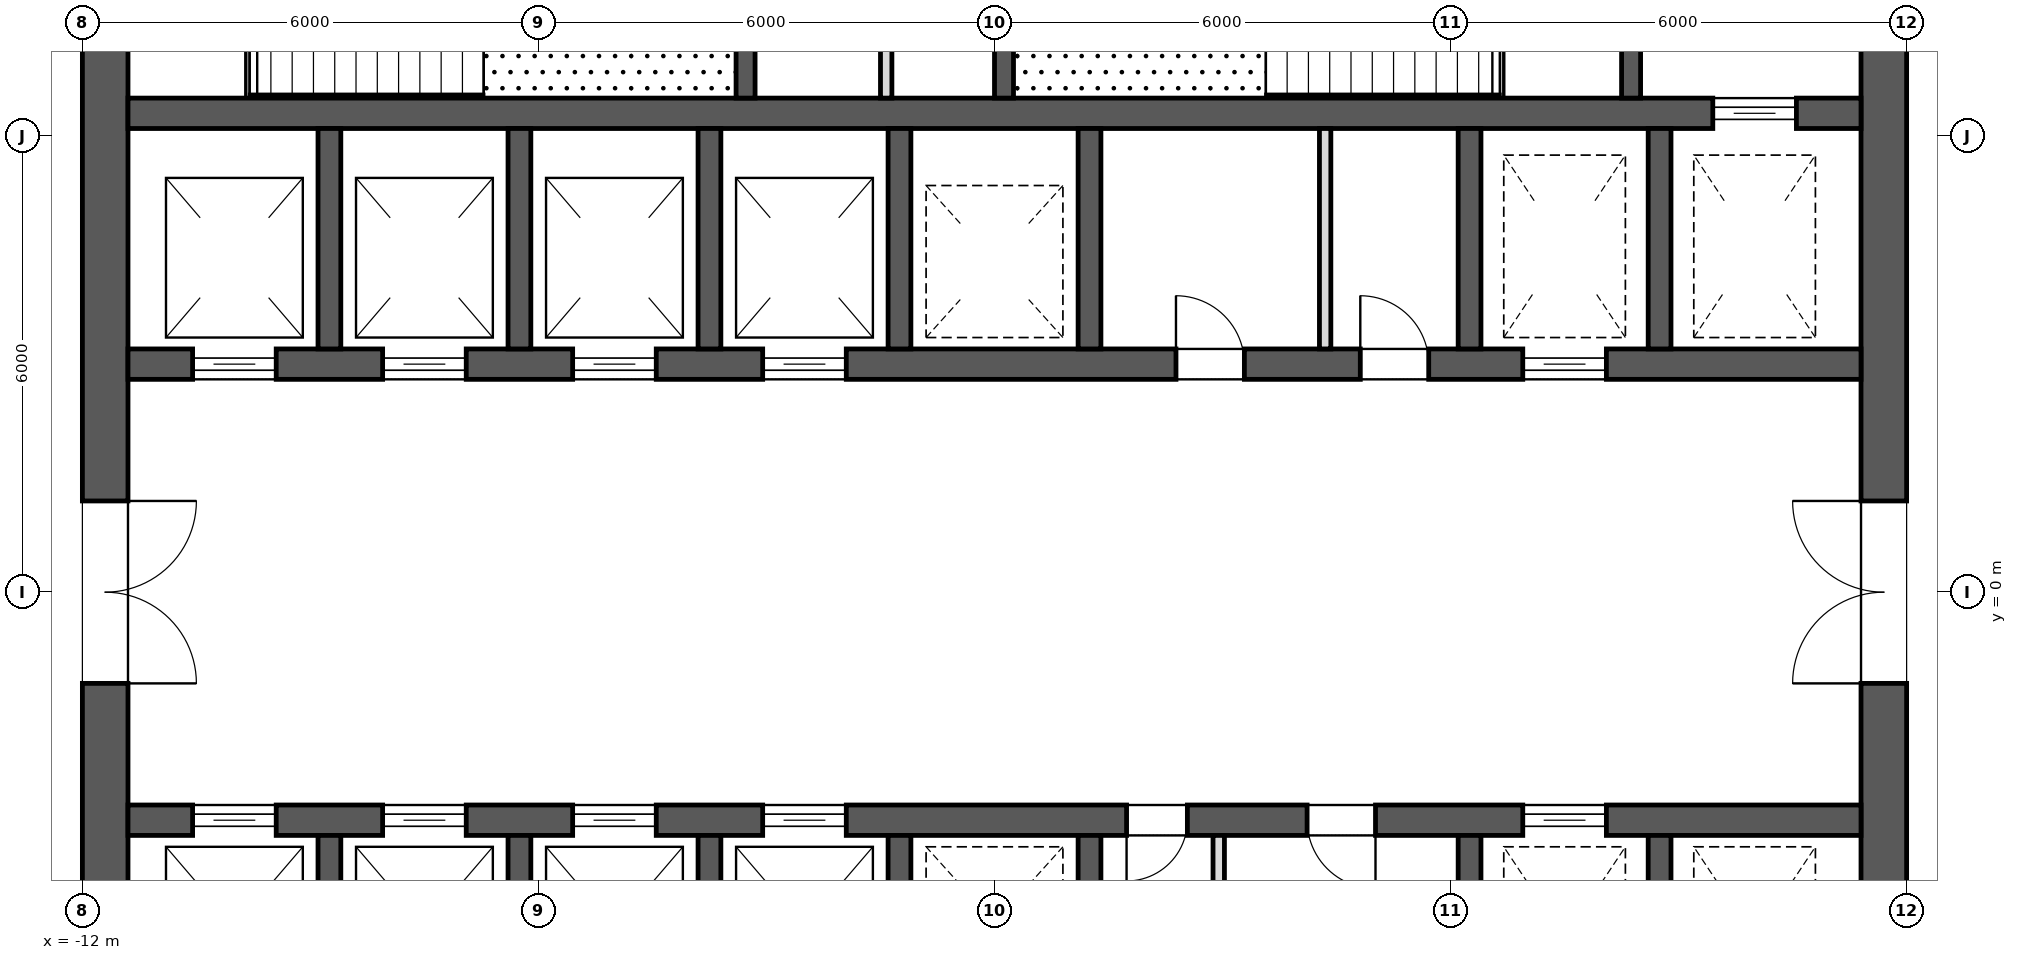
"""IFC4 building model, lengths in metres.
Left out: names, types, materials, properties, quantities, classifications, styles, units other than length and angle.
Written with IfcOpenShell. Run it as: python <this file> out.ifc"""

import sys

from ifc_helpers import new_model, si_unit, direction, frame, frame_2d, origin, place, context, subcontext, project, spatial, rectangle, extrude, element, fill, save


model = new_model("IFC4")
c1 = context("Model", 3, precision=1e-05, world=origin(), true_north=direction((0.0, 1.0)))
c2 = subcontext(c1, "Body", "Model", "MODEL_VIEW")
j1 = project(units=[si_unit("LENGTHUNIT", "METRE"), si_unit("PLANEANGLEUNIT", "RADIAN")], contexts=[c1])
p1 = place(None, origin())
s1 = spatial("IfcSite", under=j1, at=p1, CompositionType="ELEMENT")
p2 = place(p1, origin())
s2 = spatial("IfcBuilding", under=s1, at=p2, CompositionType="ELEMENT")
p3 = place(p2, frame((0.0, 0.0, 210.9)))
s3 = spatial("IfcBuildingStorey", under=s2, at=p3, CompositionType="ELEMENT", Elevation=210.9)
p4 = place(p3, frame((11.7, -11.4, 0.0), z_axis=(0.0, 0.0, 1.0), x_axis=(0.0, 1.0, 0.0)))
e1 = element("IfcWall", 1, at=p4, inside=s3, PredefinedType="SHEAR", context=c2, shape_type="SweptSolid", body=[
    extrude(rectangle(XDim=22.8, YDim=0.6, at=frame_2d((11.4, 0.0))), origin(), (0.0, 0.0, 1.0), 4.0),
])
p5 = place(p4, frame((10.2, 0.0, 0.0)))
e2 = element("IfcOpeningElement", 2, at=p5, cuts=e1, PredefinedType="OPENING", context=c2, shape_type="SweptSolid", body=[
    extrude(rectangle(XDim=2.4, YDim=2.1, at=frame_2d((1.2, 1.05))), frame((0.0, 0.312, 0.0), z_axis=(0.0, -1.0, 0.0), x_axis=(1.0, 0.0, 0.0)), (0.0, 0.0, 1.0), 0.624),
])
p6 = place(p4, frame((19.5, 0.0, 0.0)))
e3 = element("IfcOpeningElement", 3, at=p6, cuts=e1, PredefinedType="OPENING", context=c2, shape_type="SweptSolid", body=[
    extrude(rectangle(XDim=1.2, YDim=2.1, at=frame_2d((0.6, 1.05))), frame((0.0, 0.312, 0.0), z_axis=(0.0, -1.0, 0.0), x_axis=(1.0, 0.0, 0.0)), (0.0, 0.0, 1.0), 0.624),
])
p7 = place(p4, frame((2.1, 0.0, 0.0)))
e4 = element("IfcOpeningElement", 4, at=p7, cuts=e1, PredefinedType="OPENING", context=c2, shape_type="SweptSolid", body=[
    extrude(rectangle(XDim=1.2, YDim=2.1, at=frame_2d((0.6, 1.05))), frame((0.0, 0.312, 0.0), z_axis=(0.0, -1.0, 0.0), x_axis=(1.0, 0.0, 0.0)), (0.0, 0.0, 1.0), 0.624),
])
p8 = place(p3, frame((-11.7, -11.4, 0.0), z_axis=(0.0, 0.0, 1.0), x_axis=(0.0, 1.0, 0.0)))
e5 = element("IfcWall", 5, at=p8, inside=s3, PredefinedType="SHEAR", context=c2, shape_type="SweptSolid", body=[
    extrude(rectangle(XDim=22.8, YDim=0.6, at=frame_2d((11.4, 0.0))), origin(), (0.0, 0.0, 1.0), 4.0),
])
p9 = place(p8, frame((10.2, 0.0, 0.0)))
e6 = element("IfcOpeningElement", 6, at=p9, cuts=e5, PredefinedType="OPENING", context=c2, shape_type="SweptSolid", body=[
    extrude(rectangle(XDim=2.4, YDim=2.1, at=frame_2d((1.2, 1.05))), frame((0.0, 0.312, 0.0), z_axis=(0.0, -1.0, 0.0), x_axis=(1.0, 0.0, 0.0)), (0.0, 0.0, 1.0), 0.624),
])
p10 = place(p8, frame((18.925, 0.0, 0.0)))
e7 = element("IfcOpeningElement", 7, at=p10, cuts=e5, PredefinedType="OPENING", context=c2, shape_type="SweptSolid", body=[
    extrude(rectangle(XDim=1.2, YDim=2.1, at=frame_2d((0.6, 1.05))), frame((0.0, 0.312, 0.0), z_axis=(0.0, -1.0, 0.0), x_axis=(1.0, 0.0, 0.0)), (0.0, 0.0, 1.0), 0.624),
])
p11 = place(p8, frame((2.675, 0.0, 0.0)))
e8 = element("IfcOpeningElement", 8, at=p11, cuts=e5, PredefinedType="OPENING", context=c2, shape_type="SweptSolid", body=[
    extrude(rectangle(XDim=1.2, YDim=2.1, at=frame_2d((0.6, 1.05))), frame((0.0, 0.312, 0.0), z_axis=(0.0, -1.0, 0.0), x_axis=(1.0, 0.0, 0.0)), (0.0, 0.0, 1.0), 0.624),
])
p12 = place(p3, frame((-11.4, 3.0, 0.0), z_axis=(0.0, 0.0, 1.0), x_axis=(1.0, 0.0, 0.0)))
e9 = element("IfcWall", 9, at=p12, inside=s3, PredefinedType="SHEAR", context=c2, shape_type="SweptSolid", body=[
    extrude(rectangle(XDim=22.8, YDim=0.4, at=frame_2d((11.4, 0.0))), origin(), (0.0, 0.0, 1.0), 4.0),
])
p13 = place(p12, frame((0.85, 0.0, 0.0)))
e10 = element("IfcOpeningElement", 10, at=p13, cuts=e9, PredefinedType="OPENING", context=c2, shape_type="SweptSolid", body=[
    extrude(rectangle(XDim=1.1, YDim=2.1, at=frame_2d((0.55, 1.05))), frame((0.0, 0.212, 0.0), z_axis=(0.0, -1.0, 0.0), x_axis=(1.0, 0.0, 0.0)), (0.0, 0.0, 1.0), 0.424),
])
p14 = place(p12, frame((3.35, 0.0, 0.0)))
e11 = element("IfcOpeningElement", 11, at=p14, cuts=e9, PredefinedType="OPENING", context=c2, shape_type="SweptSolid", body=[
    extrude(rectangle(XDim=1.1, YDim=2.1, at=frame_2d((0.55, 1.05))), frame((0.0, 0.212, 0.0), z_axis=(0.0, -1.0, 0.0), x_axis=(1.0, 0.0, 0.0)), (0.0, 0.0, 1.0), 0.424),
])
p15 = place(p12, frame((5.85, 0.0, 0.0)))
e12 = element("IfcOpeningElement", 12, at=p15, cuts=e9, PredefinedType="OPENING", context=c2, shape_type="SweptSolid", body=[
    extrude(rectangle(XDim=1.1, YDim=2.1, at=frame_2d((0.55, 1.05))), frame((0.0, 0.212, 0.0), z_axis=(0.0, -1.0, 0.0), x_axis=(1.0, 0.0, 0.0)), (0.0, 0.0, 1.0), 0.424),
])
p16 = place(p12, frame((8.35, 0.0, 0.0)))
e13 = element("IfcOpeningElement", 13, at=p16, cuts=e9, PredefinedType="OPENING", context=c2, shape_type="SweptSolid", body=[
    extrude(rectangle(XDim=1.1, YDim=2.1, at=frame_2d((0.55, 1.05))), frame((0.0, 0.212, 0.0), z_axis=(0.0, -1.0, 0.0), x_axis=(1.0, 0.0, 0.0)), (0.0, 0.0, 1.0), 0.424),
])
p17 = place(p12, frame((18.35, 0.0, 0.0)))
e14 = element("IfcOpeningElement", 14, at=p17, cuts=e9, PredefinedType="OPENING", context=c2, shape_type="SweptSolid", body=[
    extrude(rectangle(XDim=1.1, YDim=2.1, at=frame_2d((0.55, 1.05))), frame((0.0, 0.212, 0.0), z_axis=(0.0, -1.0, 0.0), x_axis=(1.0, 0.0, 0.0)), (0.0, 0.0, 1.0), 0.424),
])
p18 = place(p12, frame((13.788, 0.0, 0.0)))
e15 = element("IfcOpeningElement", 15, at=p18, cuts=e9, PredefinedType="OPENING", context=c2, shape_type="SweptSolid", body=[
    extrude(rectangle(XDim=0.9, YDim=2.1, at=frame_2d((0.45, 1.05))), frame((0.0, 0.212, 0.0), z_axis=(0.0, -1.0, 0.0), x_axis=(1.0, 0.0, 0.0)), (0.0, 0.0, 1.0), 0.424),
])
p19 = place(p12, frame((16.212, 0.0, 0.0)))
e16 = element("IfcOpeningElement", 16, at=p19, cuts=e9, PredefinedType="OPENING", context=c2, shape_type="SweptSolid", body=[
    extrude(rectangle(XDim=0.9, YDim=2.1, at=frame_2d((0.45, 1.05))), frame((0.0, 0.212, 0.0), z_axis=(0.0, -1.0, 0.0), x_axis=(1.0, 0.0, 0.0)), (0.0, 0.0, 1.0), 0.424),
])
p20 = place(p3, frame((-11.4, 6.3, 0.0), z_axis=(0.0, 0.0, 1.0), x_axis=(1.0, 0.0, 0.0)))
e17 = element("IfcWall", 17, at=p20, inside=s3, PredefinedType="SHEAR", context=c2, shape_type="SweptSolid", body=[
    extrude(rectangle(XDim=22.8, YDim=0.4, at=frame_2d((11.4, 0.0))), origin(), (0.0, 0.0, 1.0), 4.0),
])
p21 = place(p20, frame((20.85, 0.0, 0.0)))
e18 = element("IfcOpeningElement", 18, at=p21, cuts=e17, PredefinedType="OPENING", context=c2, shape_type="SweptSolid", body=[
    extrude(rectangle(XDim=1.1, YDim=2.1, at=frame_2d((0.55, 1.05))), frame((0.0, 0.212, 0.0), z_axis=(0.0, -1.0, 0.0), x_axis=(1.0, 0.0, 0.0)), (0.0, 0.0, 1.0), 0.424),
])
for number, where, z_axis, x_axis in (
    (19, (-8.75, 3.2, 0.0), (0.0, 0.0, 1.0), (0.0, 1.0, 0.0)),
    (20, (-6.25, 3.2, 0.0), (0.0, 0.0, 1.0), (0.0, 1.0, 0.0)),
    (21, (-3.75, 3.2, 0.0), (0.0, 0.0, 1.0), (0.0, 1.0, 0.0)),
    (22, (-1.25, 3.2, 0.0), (0.0, 0.0, 1.0), (0.0, 1.0, 0.0)),
    (23, (1.25, 3.2, 0.0), (0.0, 0.0, 1.0), (0.0, 1.0, 0.0)),
    (24, (6.25, 3.2, 0.0), (0.0, 0.0, 1.0), (0.0, 1.0, 0.0)),
    (25, (8.75, 3.2, 0.0), (0.0, 0.0, 1.0), (0.0, 1.0, 0.0)),
):
    element("IfcWall", number, at=place(p3, frame(where, z_axis=z_axis, x_axis=x_axis)), inside=s3, PredefinedType="SHEAR", context=c2, shape_type="SweptSolid", body=[
        extrude(rectangle(XDim=2.9, YDim=0.3, at=frame_2d((1.45, 0.0))), origin(), (0.0, 0.0, 1.0), 4.0),
    ])
p22 = place(p3, frame((-11.4, -3.0, 0.0), z_axis=(0.0, 0.0, 1.0), x_axis=(1.0, 0.0, 0.0)))
e26 = element("IfcWall", 26, at=p22, inside=s3, PredefinedType="SHEAR", context=c2, shape_type="SweptSolid", body=[
    extrude(rectangle(XDim=22.8, YDim=0.4, at=frame_2d((11.4, 0.0))), origin(), (0.0, 0.0, 1.0), 4.0),
])
p23 = place(p22, frame((0.85, 0.0, 0.0)))
e27 = element("IfcOpeningElement", 27, at=p23, cuts=e26, PredefinedType="OPENING", context=c2, shape_type="SweptSolid", body=[
    extrude(rectangle(XDim=1.1, YDim=2.1, at=frame_2d((0.55, 1.05))), frame((0.0, 0.212, 0.0), z_axis=(0.0, -1.0, 0.0), x_axis=(1.0, 0.0, 0.0)), (0.0, 0.0, 1.0), 0.424),
])
p24 = place(p22, frame((3.35, 0.0, 0.0)))
e28 = element("IfcOpeningElement", 28, at=p24, cuts=e26, PredefinedType="OPENING", context=c2, shape_type="SweptSolid", body=[
    extrude(rectangle(XDim=1.1, YDim=2.1, at=frame_2d((0.55, 1.05))), frame((0.0, 0.212, 0.0), z_axis=(0.0, -1.0, 0.0), x_axis=(1.0, 0.0, 0.0)), (0.0, 0.0, 1.0), 0.424),
])
p25 = place(p22, frame((5.85, 0.0, 0.0)))
e29 = element("IfcOpeningElement", 29, at=p25, cuts=e26, PredefinedType="OPENING", context=c2, shape_type="SweptSolid", body=[
    extrude(rectangle(XDim=1.1, YDim=2.1, at=frame_2d((0.55, 1.05))), frame((0.0, 0.212, 0.0), z_axis=(0.0, -1.0, 0.0), x_axis=(1.0, 0.0, 0.0)), (0.0, 0.0, 1.0), 0.424),
])
p26 = place(p22, frame((8.35, 0.0, 0.0)))
e30 = element("IfcOpeningElement", 30, at=p26, cuts=e26, PredefinedType="OPENING", context=c2, shape_type="SweptSolid", body=[
    extrude(rectangle(XDim=1.1, YDim=2.1, at=frame_2d((0.55, 1.05))), frame((0.0, 0.212, 0.0), z_axis=(0.0, -1.0, 0.0), x_axis=(1.0, 0.0, 0.0)), (0.0, 0.0, 1.0), 0.424),
])
p27 = place(p22, frame((18.35, 0.0, 0.0)))
e31 = element("IfcOpeningElement", 31, at=p27, cuts=e26, PredefinedType="OPENING", context=c2, shape_type="SweptSolid", body=[
    extrude(rectangle(XDim=1.1, YDim=2.1, at=frame_2d((0.55, 1.05))), frame((0.0, 0.212, 0.0), z_axis=(0.0, -1.0, 0.0), x_axis=(1.0, 0.0, 0.0)), (0.0, 0.0, 1.0), 0.424),
])
p28 = place(p22, frame((13.137, 0.0, 0.0)))
e32 = element("IfcOpeningElement", 32, at=p28, cuts=e26, PredefinedType="OPENING", context=c2, shape_type="SweptSolid", body=[
    extrude(rectangle(XDim=0.8, YDim=2.1, at=frame_2d((0.4, 1.05))), frame((0.0, 0.212, 0.0), z_axis=(0.0, -1.0, 0.0), x_axis=(1.0, 0.0, 0.0)), (0.0, 0.0, 1.0), 0.424),
])
p29 = place(p22, frame((15.512, 0.0, 0.0)))
e33 = element("IfcOpeningElement", 33, at=p29, cuts=e26, PredefinedType="OPENING", context=c2, shape_type="SweptSolid", body=[
    extrude(rectangle(XDim=0.9, YDim=2.1, at=frame_2d((0.45, 1.05))), frame((0.0, 0.212, 0.0), z_axis=(0.0, -1.0, 0.0), x_axis=(1.0, 0.0, 0.0)), (0.0, 0.0, 1.0), 0.424),
])
for number, where, z_axis, x_axis in (
    (34, (-8.75, -6.1, 0.0), (0.0, 0.0, 1.0), (0.0, 1.0, 0.0)),
    (35, (-6.25, -6.1, 0.0), (0.0, 0.0, 1.0), (0.0, 1.0, 0.0)),
    (36, (-3.75, -6.1, 0.0), (0.0, 0.0, 1.0), (0.0, 1.0, 0.0)),
    (37, (-1.25, -6.1, 0.0), (0.0, 0.0, 1.0), (0.0, 1.0, 0.0)),
    (38, (1.25, -6.1, 0.0), (0.0, 0.0, 1.0), (0.0, 1.0, 0.0)),
    (39, (6.25, -6.1, 0.0), (0.0, 0.0, 1.0), (0.0, 1.0, 0.0)),
    (40, (8.75, -6.1, 0.0), (0.0, 0.0, 1.0), (0.0, 1.0, 0.0)),
):
    element("IfcWall", number, at=place(p3, frame(where, z_axis=z_axis, x_axis=x_axis)), inside=s3, PredefinedType="SHEAR", context=c2, shape_type="SweptSolid", body=[
        extrude(rectangle(XDim=2.9, YDim=0.3, at=frame_2d((1.45, 0.0))), origin(), (0.0, 0.0, 1.0), 4.0),
    ])
for number, where, z_axis, x_axis in (
    (41, (-3.275, 6.5, 0.0), (0.0, 0.0, 1.0), (0.0, 1.0, 0.0)),
    (42, (0.125, 6.5, 0.0), (0.0, 0.0, 1.0), (0.0, 1.0, 0.0)),
):
    element("IfcWall", number, at=place(p3, frame(where, z_axis=z_axis, x_axis=x_axis)), inside=s3, PredefinedType="SHEAR", context=c2, shape_type="SweptSolid", body=[
        extrude(rectangle(XDim=4.9, YDim=0.25, at=frame_2d((2.45, 0.0))), origin(), (0.0, 0.0, 1.0), 3.7),
    ])
p30 = place(p3, frame((8.375, 6.5, 0.0), z_axis=(0.0, 0.0, 1.0), x_axis=(0.0, 1.0, 0.0)))
e43 = element("IfcWall", 43, at=p30, inside=s3, PredefinedType="SHEAR", context=c2, shape_type="SweptSolid", body=[
    extrude(rectangle(XDim=3.4, YDim=0.25, at=frame_2d((1.7, 0.0))), origin(), (0.0, 0.0, 1.0), 3.7),
])
p31 = place(p30, frame((1.025, 0.0, 0.0)))
e44 = element("IfcOpeningElement", 44, at=p31, cuts=e43, PredefinedType="OPENING", context=c2, shape_type="SweptSolid", body=[
    extrude(rectangle(XDim=1.2, YDim=2.1, at=frame_2d((0.6, 1.05))), frame((0.0, 0.137, 0.0), z_axis=(0.0, -1.0, 0.0), x_axis=(1.0, 0.0, 0.0)), (0.0, 0.0, 1.0), 0.274),
])
p32 = place(p3, frame((-1.425, 6.5, 0.0), z_axis=(0.0, 0.0, 1.0), x_axis=(0.0, 1.0, 0.0)))
e45 = element("IfcWall", 45, at=p32, inside=s3, PredefinedType="PARTITIONING", context=c2, shape_type="SweptSolid", body=[
    extrude(rectangle(XDim=4.9, YDim=0.15, at=frame_2d((2.45, 0.0))), origin(), (0.0, 0.0, 1.0), 3.7),
])
for number, where, z_axis, x_axis in (
    (46, (4.35, 3.2, 0.0), (0.0, 0.0, 1.0), (0.0, 1.0, 0.0)),
    (47, (2.95, -6.1, 0.0), (0.0, 0.0, 1.0), (0.0, 1.0, 0.0)),
):
    element("IfcWall", number, at=place(p3, frame(where, z_axis=z_axis, x_axis=x_axis)), inside=s3, PredefinedType="PARTITIONING", context=c2, shape_type="SweptSolid", body=[
        extrude(rectangle(XDim=2.9, YDim=0.15, at=frame_2d((1.45, 0.0))), origin(), (0.0, 0.0, 1.0), 3.7),
    ])
p33 = place(p21, origin())
e48 = element("IfcDoor", 48, at=p33, inside=s3, OperationType="SLIDING_TO_LEFT", PredefinedType="DOOR", context=c2, shape_type="SweptSolid", body=[
    extrude(rectangle(XDim=1.1, YDim=2.1, at=frame_2d((0.55, 1.05))), frame((0.0, 0.025, 0.0), z_axis=(0.0, -1.0, 0.0), x_axis=(1.0, 0.0, 0.0)), (0.0, 0.0, 1.0), 0.05),
])
fill(e18, e48)
p34 = place(p13, origin())
e49 = element("IfcDoor", 49, at=p34, inside=s3, OperationType="SLIDING_TO_LEFT", PredefinedType="DOOR", context=c2, shape_type="SweptSolid", body=[
    extrude(rectangle(XDim=1.1, YDim=2.1, at=frame_2d((0.55, 1.05))), frame((0.0, 0.025, 0.0), z_axis=(0.0, -1.0, 0.0), x_axis=(1.0, 0.0, 0.0)), (0.0, 0.0, 1.0), 0.05),
])
fill(e10, e49)
p35 = place(p14, origin())
e50 = element("IfcDoor", 50, at=p35, inside=s3, OperationType="SLIDING_TO_LEFT", PredefinedType="DOOR", context=c2, shape_type="SweptSolid", body=[
    extrude(rectangle(XDim=1.1, YDim=2.1, at=frame_2d((0.55, 1.05))), frame((0.0, 0.025, 0.0), z_axis=(0.0, -1.0, 0.0), x_axis=(1.0, 0.0, 0.0)), (0.0, 0.0, 1.0), 0.05),
])
fill(e11, e50)
p36 = place(p23, origin())
e51 = element("IfcDoor", 51, at=p36, inside=s3, OperationType="SLIDING_TO_LEFT", PredefinedType="DOOR", context=c2, shape_type="SweptSolid", body=[
    extrude(rectangle(XDim=1.1, YDim=2.1, at=frame_2d((0.55, 1.05))), frame((0.0, 0.025, 0.0), z_axis=(0.0, -1.0, 0.0), x_axis=(1.0, 0.0, 0.0)), (0.0, 0.0, 1.0), 0.05),
])
fill(e27, e51)
p37 = place(p24, origin())
e52 = element("IfcDoor", 52, at=p37, inside=s3, OperationType="SLIDING_TO_LEFT", PredefinedType="DOOR", context=c2, shape_type="SweptSolid", body=[
    extrude(rectangle(XDim=1.1, YDim=2.1, at=frame_2d((0.55, 1.05))), frame((0.0, 0.025, 0.0), z_axis=(0.0, -1.0, 0.0), x_axis=(1.0, 0.0, 0.0)), (0.0, 0.0, 1.0), 0.05),
])
fill(e28, e52)
p38 = place(p15, origin())
e53 = element("IfcDoor", 53, at=p38, inside=s3, OperationType="SLIDING_TO_LEFT", PredefinedType="DOOR", context=c2, shape_type="SweptSolid", body=[
    extrude(rectangle(XDim=1.1, YDim=2.1, at=frame_2d((0.55, 1.05))), frame((0.0, 0.025, 0.0), z_axis=(0.0, -1.0, 0.0), x_axis=(1.0, 0.0, 0.0)), (0.0, 0.0, 1.0), 0.05),
])
fill(e12, e53)
p39 = place(p16, origin())
e54 = element("IfcDoor", 54, at=p39, inside=s3, OperationType="SLIDING_TO_LEFT", PredefinedType="DOOR", context=c2, shape_type="SweptSolid", body=[
    extrude(rectangle(XDim=1.1, YDim=2.1, at=frame_2d((0.55, 1.05))), frame((0.0, 0.025, 0.0), z_axis=(0.0, -1.0, 0.0), x_axis=(1.0, 0.0, 0.0)), (0.0, 0.0, 1.0), 0.05),
])
fill(e13, e54)
p40 = place(p25, origin())
e55 = element("IfcDoor", 55, at=p40, inside=s3, OperationType="SLIDING_TO_LEFT", PredefinedType="DOOR", context=c2, shape_type="SweptSolid", body=[
    extrude(rectangle(XDim=1.1, YDim=2.1, at=frame_2d((0.55, 1.05))), frame((0.0, 0.025, 0.0), z_axis=(0.0, -1.0, 0.0), x_axis=(1.0, 0.0, 0.0)), (0.0, 0.0, 1.0), 0.05),
])
fill(e29, e55)
p41 = place(p26, origin())
e56 = element("IfcDoor", 56, at=p41, inside=s3, OperationType="SLIDING_TO_LEFT", PredefinedType="DOOR", context=c2, shape_type="SweptSolid", body=[
    extrude(rectangle(XDim=1.1, YDim=2.1, at=frame_2d((0.55, 1.05))), frame((0.0, 0.025, 0.0), z_axis=(0.0, -1.0, 0.0), x_axis=(1.0, 0.0, 0.0)), (0.0, 0.0, 1.0), 0.05),
])
fill(e30, e56)
p42 = place(p17, origin())
e57 = element("IfcDoor", 57, at=p42, inside=s3, OperationType="SLIDING_TO_LEFT", PredefinedType="DOOR", context=c2, shape_type="SweptSolid", body=[
    extrude(rectangle(XDim=1.1, YDim=2.1, at=frame_2d((0.55, 1.05))), frame((0.0, 0.025, 0.0), z_axis=(0.0, -1.0, 0.0), x_axis=(1.0, 0.0, 0.0)), (0.0, 0.0, 1.0), 0.05),
])
fill(e14, e57)
p43 = place(p27, origin())
e58 = element("IfcDoor", 58, at=p43, inside=s3, OperationType="SLIDING_TO_LEFT", PredefinedType="DOOR", context=c2, shape_type="SweptSolid", body=[
    extrude(rectangle(XDim=1.1, YDim=2.1, at=frame_2d((0.55, 1.05))), frame((0.0, 0.025, 0.0), z_axis=(0.0, -1.0, 0.0), x_axis=(1.0, 0.0, 0.0)), (0.0, 0.0, 1.0), 0.05),
])
fill(e31, e58)
p44 = place(p9, frame((2.4, 0.0, 0.0), z_axis=(0.0, 0.0, 1.0), x_axis=(-1.0, 0.0, 0.0)))
e59 = element("IfcDoor", 59, at=p44, inside=s3, OperationType="DOUBLE_DOOR_SINGLE_SWING", PredefinedType="DOOR", context=c2, shape_type="SweptSolid", body=[
    extrude(rectangle(XDim=2.4, YDim=2.1, at=frame_2d((1.2, 1.05))), frame((0.0, 0.025, 0.0), z_axis=(0.0, -1.0, 0.0), x_axis=(1.0, 0.0, 0.0)), (0.0, 0.0, 1.0), 0.05),
])
fill(e6, e59)
p45 = place(p5, origin())
e60 = element("IfcDoor", 60, at=p45, inside=s3, OperationType="DOUBLE_DOOR_SINGLE_SWING", PredefinedType="DOOR", context=c2, shape_type="SweptSolid", body=[
    extrude(rectangle(XDim=2.4, YDim=2.1, at=frame_2d((1.2, 1.05))), frame((0.0, 0.025, 0.0), z_axis=(0.0, -1.0, 0.0), x_axis=(1.0, 0.0, 0.0)), (0.0, 0.0, 1.0), 0.05),
])
fill(e2, e60)
p46 = place(p18, origin())
e61 = element("IfcDoor", 61, at=p46, inside=s3, OperationType="SINGLE_SWING_RIGHT", PredefinedType="DOOR", context=c2, shape_type="SweptSolid", body=[
    extrude(rectangle(XDim=0.9, YDim=2.1, at=frame_2d((0.45, 1.05))), frame((0.0, 0.025, 0.0), z_axis=(0.0, -1.0, 0.0), x_axis=(1.0, 0.0, 0.0)), (0.0, 0.0, 1.0), 0.05),
])
fill(e15, e61)
p47 = place(p19, origin())
e62 = element("IfcDoor", 62, at=p47, inside=s3, OperationType="SINGLE_SWING_RIGHT", PredefinedType="DOOR", context=c2, shape_type="SweptSolid", body=[
    extrude(rectangle(XDim=0.9, YDim=2.1, at=frame_2d((0.45, 1.05))), frame((0.0, 0.025, 0.0), z_axis=(0.0, -1.0, 0.0), x_axis=(1.0, 0.0, 0.0)), (0.0, 0.0, 1.0), 0.05),
])
fill(e16, e62)
p48 = place(p28, frame((0.8, 0.0, 0.0), z_axis=(0.0, 0.0, 1.0), x_axis=(-1.0, 0.0, 0.0)))
e63 = element("IfcDoor", 63, at=p48, inside=s3, OperationType="SINGLE_SWING_LEFT", PredefinedType="DOOR", context=c2, shape_type="SweptSolid", body=[
    extrude(rectangle(XDim=0.8, YDim=2.1, at=frame_2d((0.4, 1.05))), frame((0.0, 0.025, 0.0), z_axis=(0.0, -1.0, 0.0), x_axis=(1.0, 0.0, 0.0)), (0.0, 0.0, 1.0), 0.05),
])
fill(e32, e63)
p49 = place(p29, frame((0.9, 0.0, 0.0), z_axis=(0.0, 0.0, 1.0), x_axis=(-1.0, 0.0, 0.0)))
e64 = element("IfcDoor", 64, at=p49, inside=s3, OperationType="SINGLE_SWING_RIGHT", PredefinedType="DOOR", context=c2, shape_type="SweptSolid", body=[
    extrude(rectangle(XDim=0.9, YDim=2.1, at=frame_2d((0.45, 1.05))), frame((0.0, 0.025, 0.0), z_axis=(0.0, -1.0, 0.0), x_axis=(1.0, 0.0, 0.0)), (0.0, 0.0, 1.0), 0.05),
])
fill(e33, e64)
save(model, sys.argv[1])
